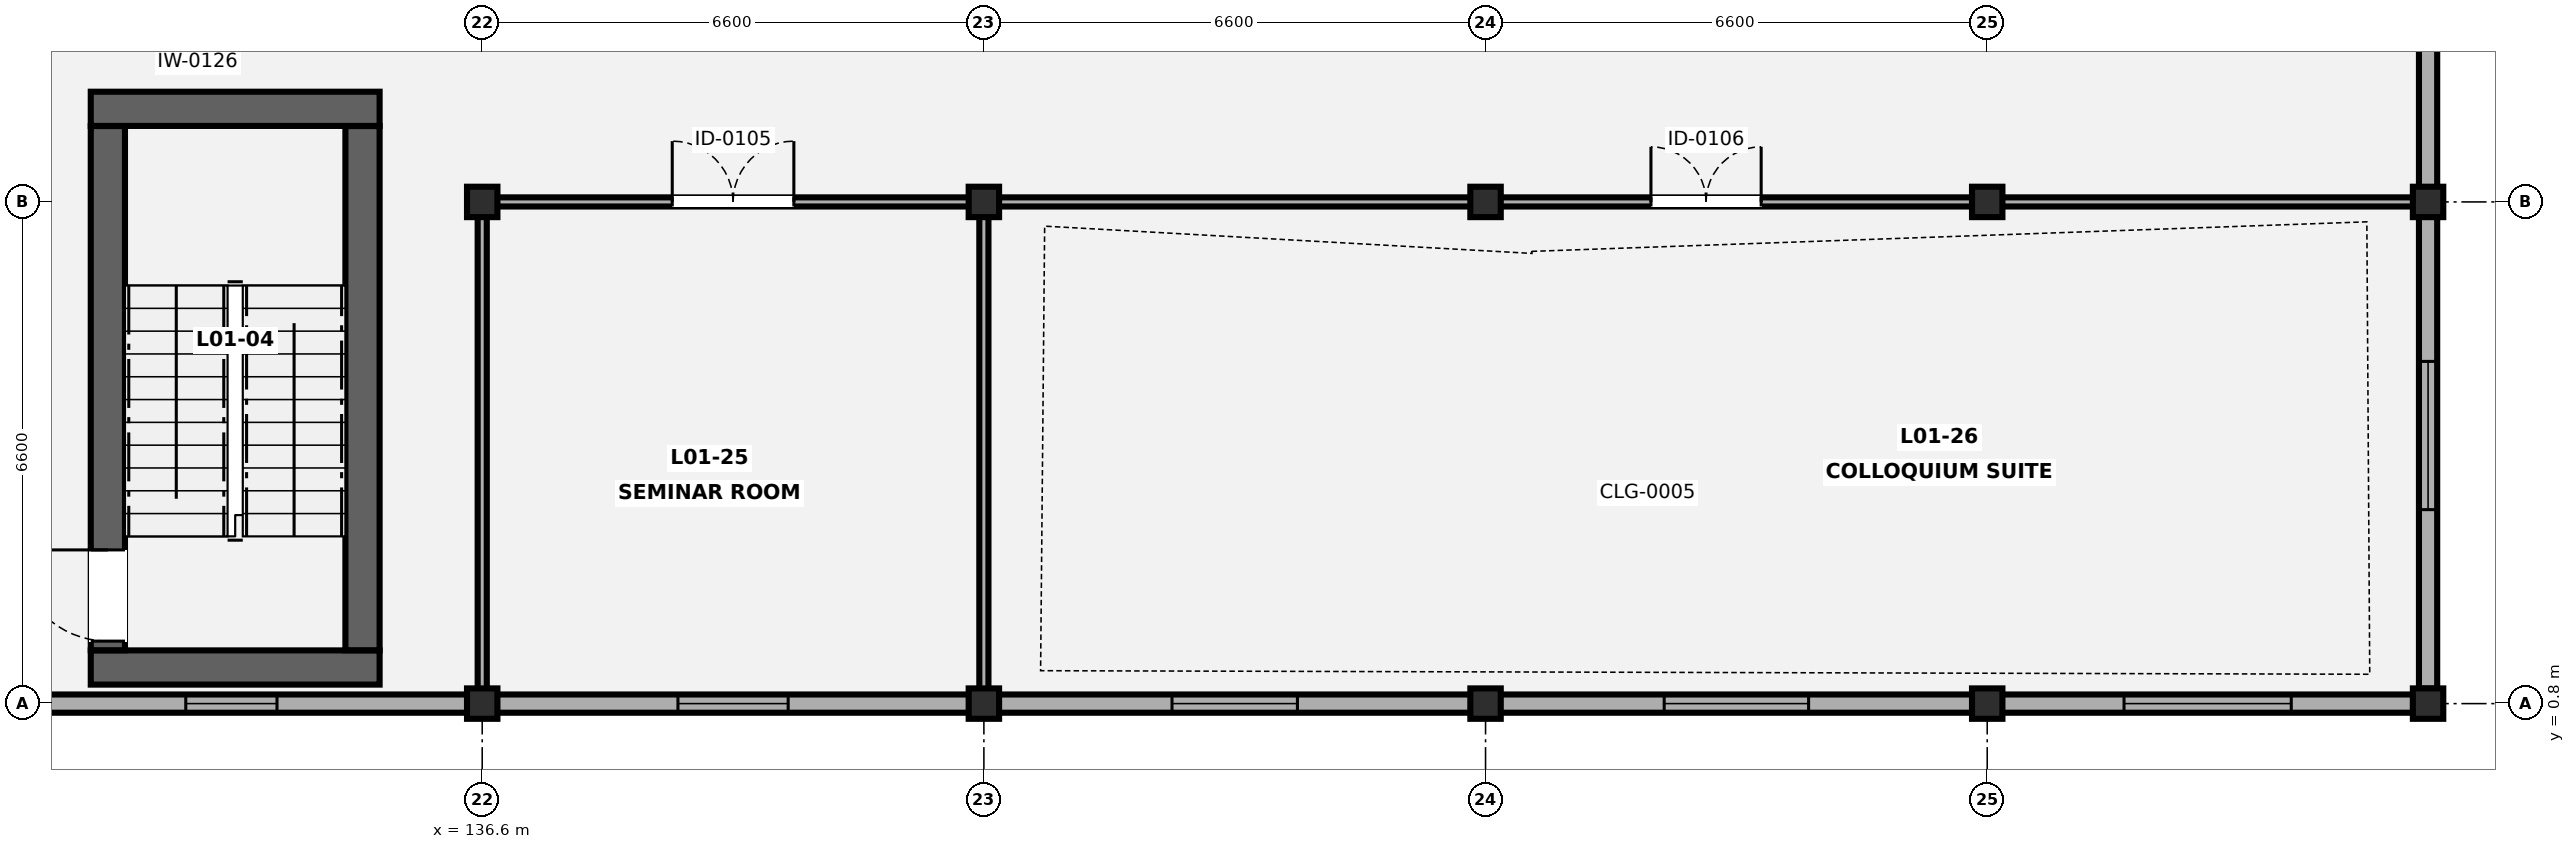
"""IFC4 building model, lengths in metres.
Left out: names, types, materials, properties, quantities, classifications, styles, units other than length and angle.
Written with IfcOpenShell. Run it as: python <this file> out.ifc"""

import sys

from ifc_helpers import new_model, si_unit, direction, frame, frame_2d, origin, origin_2d, place, context, subcontext, project, spatial, rectangle, i_section, extrude, element, fill, save


model = new_model("IFC4")
c1 = context("Model", 3, precision=1e-05, world=origin(), true_north=direction((0.0, 1.0)))
c2 = subcontext(c1, "Body", "Model", "MODEL_VIEW")
j1 = project(units=[si_unit("LENGTHUNIT", "METRE"), si_unit("PLANEANGLEUNIT", "RADIAN")], contexts=[c1])
p1 = place(None, origin())
s1 = spatial("IfcSite", under=j1, at=p1, CompositionType="ELEMENT")
p2 = place(p1, origin())
s2 = spatial("IfcBuilding", under=s1, at=p2, CompositionType="ELEMENT")
p3 = place(p2, frame((0.0, 0.0, 4.9)))
s3 = spatial("IfcBuildingStorey", under=s2, at=p3, CompositionType="ELEMENT", Elevation=4.9)
for number, where, z_axis, x_axis in (
    (1, (136.6, 0.8, 0.0), (0.0, 0.0, 1.0), (1.0, 0.0, 0.0)),
    (2, (136.6, 7.4, 0.0), (0.0, 0.0, 1.0), (1.0, 0.0, 0.0)),
    (3, (143.2, 0.8, 0.0), (0.0, 0.0, 1.0), (1.0, 0.0, 0.0)),
    (4, (143.2, 7.4, 0.0), (0.0, 0.0, 1.0), (1.0, 0.0, 0.0)),
    (5, (149.8, 0.8, 0.0), (0.0, 0.0, 1.0), (1.0, 0.0, 0.0)),
    (6, (149.8, 7.4, 0.0), (0.0, 0.0, 1.0), (1.0, 0.0, 0.0)),
    (7, (156.4, 0.8, 0.0), (0.0, 0.0, 1.0), (1.0, 0.0, 0.0)),
    (8, (156.4, 7.4, 0.0), (0.0, 0.0, 1.0), (1.0, 0.0, 0.0)),
    (9, (162.2, 0.8, 0.0), (0.0, 0.0, 1.0), (1.0, 0.0, 0.0)),
    (10, (162.2, 7.4, 0.0), (0.0, 0.0, 1.0), (1.0, 0.0, 0.0)),
):
    element("IfcColumn", number, at=place(p3, frame(where, z_axis=z_axis, x_axis=x_axis)), inside=s3, PredefinedType="COLUMN", context=c2, shape_type="SweptSolid", body=[
        extrude(i_section(OverallWidth=0.4, OverallDepth=0.4, WebThickness=0.02, FlangeThickness=0.035, FilletRadius=0.016, at=origin_2d()), origin(), (0.0, 0.0, 1.0), 4.2),
    ])
p4 = place(p3, frame((162.2, 20.402, 0.0), z_axis=(0.0, 0.0, 1.0), x_axis=(0.0, -1.0, 0.0)))
e11 = element("IfcWall", 11, at=p4, inside=s3, PredefinedType="SOLIDWALL", context=c2, shape_type="SweptSolid", body=[
    extrude(rectangle(XDim=19.404, YDim=0.24, at=frame_2d((9.702, 0.0))), origin(), (0.0, 0.0, 1.0), 3.372),
])
p5 = place(p4, frame((2.4, 0.0, 0.85)))
e12 = element("IfcOpeningElement", 12, at=p5, cuts=e11, PredefinedType="OPENING", context=c2, shape_type="SweptSolid", body=[
    extrude(rectangle(XDim=1.55, YDim=1.4, at=frame_2d((0.775, 0.7))), frame((0.0, 0.13, 0.0), z_axis=(0.0, -1.0, 0.0), x_axis=(1.0, 0.0, 0.0)), (0.0, 0.0, 1.0), 0.26),
])
p6 = place(p4, frame((15.1, 0.0, 0.85)))
e13 = element("IfcOpeningElement", 13, at=p6, cuts=e11, PredefinedType="OPENING", context=c2, shape_type="SweptSolid", body=[
    extrude(rectangle(XDim=1.95, YDim=1.5, at=frame_2d((0.975, 0.75))), frame((0.0, 0.13, 0.0), z_axis=(0.0, -1.0, 0.0), x_axis=(1.0, 0.0, 0.0)), (0.0, 0.0, 1.0), 0.26),
])
p7 = place(p3, frame((162.002, 0.8, 0.0), z_axis=(0.0, 0.0, 1.0), x_axis=(-1.0, 0.0, 0.0)))
e14 = element("IfcWall", 14, at=p7, inside=s3, PredefinedType="SOLIDWALL", context=c2, shape_type="SweptSolid", body=[
    extrude(rectangle(XDim=58.204, YDim=0.24, at=frame_2d((29.102, 0.0))), origin(), (0.0, 0.0, 1.0), 3.505),
])
p8 = place(p7, frame((54.102, 0.0, 0.85)))
e15 = element("IfcOpeningElement", 15, at=p8, cuts=e14, PredefinedType="OPENING", context=c2, shape_type="SweptSolid", body=[
    extrude(rectangle(XDim=2.0, YDim=1.4, at=frame_2d((1.0, 0.7))), frame((0.0, 0.13, 0.0), z_axis=(0.0, -1.0, 0.0), x_axis=(1.0, 0.0, 0.0)), (0.0, 0.0, 1.0), 0.26),
])
p9 = place(p7, frame((47.427, 0.0, 0.85)))
e16 = element("IfcOpeningElement", 16, at=p9, cuts=e14, PredefinedType="OPENING", context=c2, shape_type="SweptSolid", body=[
    extrude(rectangle(XDim=2.15, YDim=1.4, at=frame_2d((1.075, 0.7))), frame((0.0, 0.13, 0.0), z_axis=(0.0, -1.0, 0.0), x_axis=(1.0, 0.0, 0.0)), (0.0, 0.0, 1.0), 0.26),
])
p10 = place(p7, frame((40.752, 0.0, 0.85)))
e17 = element("IfcOpeningElement", 17, at=p10, cuts=e14, PredefinedType="OPENING", context=c2, shape_type="SweptSolid", body=[
    extrude(rectangle(XDim=2.3, YDim=1.4, at=frame_2d((1.15, 0.7))), frame((0.0, 0.13, 0.0), z_axis=(0.0, -1.0, 0.0), x_axis=(1.0, 0.0, 0.0)), (0.0, 0.0, 1.0), 0.26),
])
p11 = place(p7, frame((34.077, 0.0, 0.85)))
e18 = element("IfcOpeningElement", 18, at=p11, cuts=e14, PredefinedType="OPENING", context=c2, shape_type="SweptSolid", body=[
    extrude(rectangle(XDim=2.45, YDim=1.4, at=frame_2d((1.225, 0.7))), frame((0.0, 0.13, 0.0), z_axis=(0.0, -1.0, 0.0), x_axis=(1.0, 0.0, 0.0)), (0.0, 0.0, 1.0), 0.26),
])
p12 = place(p7, frame((28.102, 0.0, 0.85)))
e19 = element("IfcOpeningElement", 19, at=p12, cuts=e14, PredefinedType="OPENING", context=c2, shape_type="SweptSolid", body=[
    extrude(rectangle(XDim=1.2, YDim=1.25, at=frame_2d((0.6, 0.625))), frame((0.0, 0.13, 0.0), z_axis=(0.0, -1.0, 0.0), x_axis=(1.0, 0.0, 0.0)), (0.0, 0.0, 1.0), 0.26),
])
p13 = place(p7, frame((21.377, 0.0, 0.85)))
e20 = element("IfcOpeningElement", 20, at=p13, cuts=e14, PredefinedType="OPENING", context=c2, shape_type="SweptSolid", body=[
    extrude(rectangle(XDim=1.45, YDim=1.25, at=frame_2d((0.725, 0.625))), frame((0.0, 0.13, 0.0), z_axis=(0.0, -1.0, 0.0), x_axis=(1.0, 0.0, 0.0)), (0.0, 0.0, 1.0), 0.26),
])
p14 = place(p7, frame((14.677, 0.0, 0.85)))
e21 = element("IfcOpeningElement", 21, at=p14, cuts=e14, PredefinedType="OPENING", context=c2, shape_type="SweptSolid", body=[
    extrude(rectangle(XDim=1.65, YDim=1.25, at=frame_2d((0.825, 0.625))), frame((0.0, 0.13, 0.0), z_axis=(0.0, -1.0, 0.0), x_axis=(1.0, 0.0, 0.0)), (0.0, 0.0, 1.0), 0.26),
])
p15 = place(p7, frame((7.952, 0.0, 0.85)))
e22 = element("IfcOpeningElement", 22, at=p15, cuts=e14, PredefinedType="OPENING", context=c2, shape_type="SweptSolid", body=[
    extrude(rectangle(XDim=1.9, YDim=1.25, at=frame_2d((0.95, 0.625))), frame((0.0, 0.13, 0.0), z_axis=(0.0, -1.0, 0.0), x_axis=(1.0, 0.0, 0.0)), (0.0, 0.0, 1.0), 0.26),
])
p16 = place(p7, frame((1.602, 0.0, 0.85)))
e23 = element("IfcOpeningElement", 23, at=p16, cuts=e14, PredefinedType="OPENING", context=c2, shape_type="SweptSolid", body=[
    extrude(rectangle(XDim=2.2, YDim=1.25, at=frame_2d((1.1, 0.625))), frame((0.0, 0.13, 0.0), z_axis=(0.0, -1.0, 0.0), x_axis=(1.0, 0.0, 0.0)), (0.0, 0.0, 1.0), 0.26),
])
for number, where, z_axis, x_axis in (
    (24, (131.45, 1.275, 0.0), (0.0, 0.0, 1.0), (1.0, 0.0, 0.0)),
    (25, (131.45, 8.625, 0.0), (0.0, 0.0, 1.0), (1.0, 0.0, 0.0)),
):
    element("IfcWall", number, at=place(p3, frame(where, z_axis=z_axis, x_axis=x_axis)), inside=s3, PredefinedType="SHEAR", context=c2, shape_type="SweptSolid", body=[
        extrude(rectangle(XDim=3.8, YDim=0.45, at=frame_2d((1.9, 0.0))), origin(), (0.0, 0.0, 1.0), 4.02),
    ])
p17 = place(p3, frame((131.675, 1.502, 0.0), z_axis=(0.0, 0.0, 1.0), x_axis=(0.0, 1.0, 0.0)))
e26 = element("IfcWall", 26, at=p17, inside=s3, PredefinedType="SHEAR", context=c2, shape_type="SweptSolid", body=[
    extrude(rectangle(XDim=6.896, YDim=0.45, at=frame_2d((3.448, 0.0))), origin(), (0.0, 0.0, 1.0), 4.02),
])
p18 = place(p17, frame((0.12, 0.0, 0.0)))
e27 = element("IfcOpeningElement", 27, at=p18, cuts=e26, PredefinedType="OPENING", context=c2, shape_type="SweptSolid", body=[
    extrude(rectangle(XDim=1.2, YDim=2.15, at=frame_2d((0.6, 1.075))), frame((0.0, 0.235, 0.0), z_axis=(0.0, -1.0, 0.0), x_axis=(1.0, 0.0, 0.0)), (0.0, 0.0, 1.0), 0.47),
])
p19 = place(p3, frame((135.025, 1.502, 0.0), z_axis=(0.0, 0.0, 1.0), x_axis=(0.0, 1.0, 0.0)))
e28 = element("IfcWall", 28, at=p19, inside=s3, PredefinedType="SHEAR", context=c2, shape_type="SweptSolid", body=[
    extrude(rectangle(XDim=6.896, YDim=0.45, at=frame_2d((3.448, 0.0))), origin(), (0.0, 0.0, 1.0), 4.02),
])
p20 = place(p3, frame((136.6, 7.4, 0.0), z_axis=(0.0, 0.0, 1.0), x_axis=(1.0, 0.0, 0.0)))
e29 = element("IfcWall", 29, at=p20, inside=s3, PredefinedType="PARTITIONING", context=c2, shape_type="SweptSolid", body=[
    extrude(rectangle(XDim=6.6, YDim=0.12, at=frame_2d((3.3, 0.0))), origin(), (0.0, 0.0, 1.0), 3.293),
])
p21 = place(p20, frame((2.5, 0.0, 0.0)))
e30 = element("IfcOpeningElement", 30, at=p21, cuts=e29, PredefinedType="OPENING", context=c2, shape_type="SweptSolid", body=[
    extrude(rectangle(XDim=1.6, YDim=2.18, at=frame_2d((0.8, 1.09))), frame((0.0, 0.07, 0.0), z_axis=(0.0, -1.0, 0.0), x_axis=(1.0, 0.0, 0.0)), (0.0, 0.0, 1.0), 0.14),
])
p22 = place(p3, frame((136.6, 0.942, 0.0), z_axis=(0.0, 0.0, 1.0), x_axis=(0.0, 1.0, 0.0)))
e31 = element("IfcWall", 31, at=p22, inside=s3, PredefinedType="PARTITIONING", context=c2, shape_type="SweptSolid", body=[
    extrude(rectangle(XDim=6.396, YDim=0.12, at=frame_2d((3.198, 0.0))), origin(), (0.0, 0.0, 1.0), 3.372),
])
p23 = place(p3, frame((143.2, 0.942, 0.0), z_axis=(0.0, 0.0, 1.0), x_axis=(0.0, 1.0, 0.0)))
e32 = element("IfcWall", 32, at=p23, inside=s3, PredefinedType="PARTITIONING", context=c2, shape_type="SweptSolid", body=[
    extrude(rectangle(XDim=6.458, YDim=0.12, at=frame_2d((3.229, 0.0))), origin(), (0.0, 0.0, 1.0), 3.372),
])
p24 = place(p3, frame((143.202, 7.4, 0.0), z_axis=(0.0, 0.0, 1.0), x_axis=(1.0, 0.0, 0.0)))
e33 = element("IfcWall", 33, at=p24, inside=s3, PredefinedType="PARTITIONING", context=c2, shape_type="SweptSolid", body=[
    extrude(rectangle(XDim=18.998, YDim=0.12, at=frame_2d((9.499, 0.0))), origin(), (0.0, 0.0, 1.0), 3.293),
])
p25 = place(p24, frame((8.774, 0.0, 0.0)))
e34 = element("IfcOpeningElement", 34, at=p25, cuts=e33, PredefinedType="OPENING", context=c2, shape_type="SweptSolid", body=[
    extrude(rectangle(XDim=1.45, YDim=2.12, at=frame_2d((0.725, 1.06))), frame((0.0, 0.07, 0.0), z_axis=(0.0, -1.0, 0.0), x_axis=(1.0, 0.0, 0.0)), (0.0, 0.0, 1.0), 0.14),
])
p26 = place(p6, origin())
e35 = element("IfcWindow", 35, at=p26, inside=s3, PartitioningType="SINGLE_PANEL", PredefinedType="WINDOW", context=c2, shape_type="SweptSolid", body=[
    extrude(rectangle(XDim=1.95, YDim=1.5, at=frame_2d((0.975, 0.75))), frame((0.0, 0.03, 0.0), z_axis=(0.0, -1.0, 0.0), x_axis=(1.0, 0.0, 0.0)), (0.0, 0.0, 1.0), 0.06),
])
fill(e13, e35)
p27 = place(p12, origin())
e36 = element("IfcWindow", 36, at=p27, inside=s3, PartitioningType="SINGLE_PANEL", PredefinedType="WINDOW", context=c2, shape_type="SweptSolid", body=[
    extrude(rectangle(XDim=1.2, YDim=1.25, at=frame_2d((0.6, 0.625))), frame((0.0, 0.03, 0.0), z_axis=(0.0, -1.0, 0.0), x_axis=(1.0, 0.0, 0.0)), (0.0, 0.0, 1.0), 0.06),
])
fill(e19, e36)
p28 = place(p13, origin())
e37 = element("IfcWindow", 37, at=p28, inside=s3, PartitioningType="SINGLE_PANEL", PredefinedType="WINDOW", context=c2, shape_type="SweptSolid", body=[
    extrude(rectangle(XDim=1.45, YDim=1.25, at=frame_2d((0.725, 0.625))), frame((0.0, 0.03, 0.0), z_axis=(0.0, -1.0, 0.0), x_axis=(1.0, 0.0, 0.0)), (0.0, 0.0, 1.0), 0.06),
])
fill(e20, e37)
p29 = place(p14, origin())
e38 = element("IfcWindow", 38, at=p29, inside=s3, PartitioningType="SINGLE_PANEL", PredefinedType="WINDOW", context=c2, shape_type="SweptSolid", body=[
    extrude(rectangle(XDim=1.65, YDim=1.25, at=frame_2d((0.825, 0.625))), frame((0.0, 0.03, 0.0), z_axis=(0.0, -1.0, 0.0), x_axis=(1.0, 0.0, 0.0)), (0.0, 0.0, 1.0), 0.06),
])
fill(e21, e38)
p30 = place(p15, origin())
e39 = element("IfcWindow", 39, at=p30, inside=s3, PartitioningType="SINGLE_PANEL", PredefinedType="WINDOW", context=c2, shape_type="SweptSolid", body=[
    extrude(rectangle(XDim=1.9, YDim=1.25, at=frame_2d((0.95, 0.625))), frame((0.0, 0.03, 0.0), z_axis=(0.0, -1.0, 0.0), x_axis=(1.0, 0.0, 0.0)), (0.0, 0.0, 1.0), 0.06),
])
fill(e22, e39)
p31 = place(p16, origin())
e40 = element("IfcWindow", 40, at=p31, inside=s3, PartitioningType="SINGLE_PANEL", PredefinedType="WINDOW", context=c2, shape_type="SweptSolid", body=[
    extrude(rectangle(XDim=2.2, YDim=1.25, at=frame_2d((1.1, 0.625))), frame((0.0, 0.03, 0.0), z_axis=(0.0, -1.0, 0.0), x_axis=(1.0, 0.0, 0.0)), (0.0, 0.0, 1.0), 0.06),
])
fill(e23, e40)
p32 = place(p18, origin())
e41 = element("IfcDoor", 41, at=p32, inside=s3, OperationType="SINGLE_SWING_RIGHT", PredefinedType="DOOR", context=c2, shape_type="SweptSolid", body=[
    extrude(rectangle(XDim=1.2, YDim=2.15, at=frame_2d((0.6, 1.075))), frame((0.0, 0.025, 0.0), z_axis=(0.0, -1.0, 0.0), x_axis=(1.0, 0.0, 0.0)), (0.0, 0.0, 1.0), 0.05),
])
fill(e27, e41)
p33 = place(p21, origin())
e42 = element("IfcDoor", 42, at=p33, inside=s3, OperationType="DOUBLE_DOOR_SINGLE_SWING", PredefinedType="DOOR", context=c2, shape_type="SweptSolid", body=[
    extrude(rectangle(XDim=1.6, YDim=2.18, at=frame_2d((0.8, 1.09))), frame((0.0, 0.025, 0.0), z_axis=(0.0, -1.0, 0.0), x_axis=(1.0, 0.0, 0.0)), (0.0, 0.0, 1.0), 0.05),
])
fill(e30, e42)
p34 = place(p25, origin())
e43 = element("IfcDoor", 43, at=p34, inside=s3, OperationType="DOUBLE_DOOR_SINGLE_SWING", PredefinedType="DOOR", context=c2, shape_type="SweptSolid", body=[
    extrude(rectangle(XDim=1.45, YDim=2.12, at=frame_2d((0.725, 1.06))), frame((0.0, 0.025, 0.0), z_axis=(0.0, -1.0, 0.0), x_axis=(1.0, 0.0, 0.0)), (0.0, 0.0, 1.0), 0.05),
])
fill(e34, e43)
save(model, sys.argv[1])
